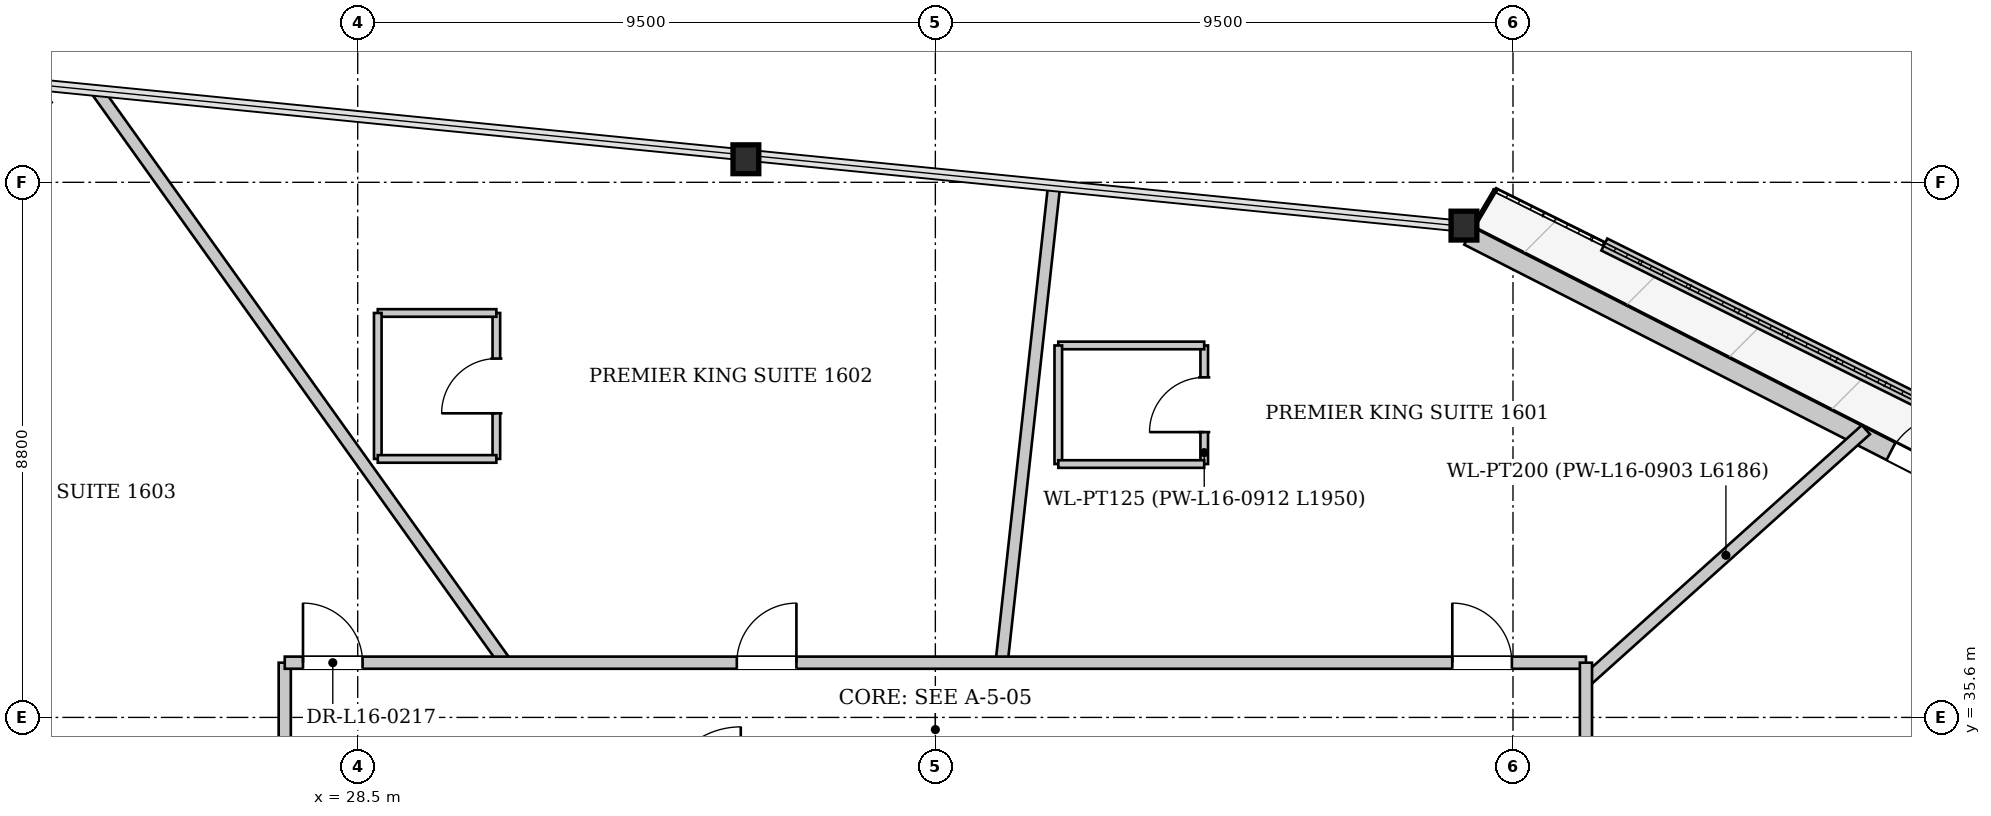
"""IFC4 building model, lengths in metres.
Left out: names, types, materials, properties, quantities, classifications, styles, units other than length and angle.
Written with IfcOpenShell. Run it as: python <this file> out.ifc"""

import sys

from ifc_helpers import new_model, si_unit, direction, frame, frame_2d, origin, origin_2d, place, context, subcontext, project, spatial, rectangle, i_section, extrude, source, transform, mapped, element, fill, save


model = new_model("IFC4")
c1 = context("Model", 3, precision=1e-05, world=origin(), true_north=direction((0.0, 1.0)))
c2 = subcontext(c1, "Body", "Model", "MODEL_VIEW")
j1 = project(units=[si_unit("LENGTHUNIT", "METRE"), si_unit("PLANEANGLEUNIT", "RADIAN")], contexts=[c1])
p1 = place(None, origin())
s1 = spatial("IfcSite", under=j1, at=p1, CompositionType="ELEMENT")
p2 = place(p1, origin())
s2 = spatial("IfcBuilding", under=s1, at=p2, CompositionType="ELEMENT")
p3 = place(p2, frame((0.0, 0.0, 64.8)))
s3 = spatial("IfcBuildingStorey", under=s2, at=p3, CompositionType="ELEMENT", Elevation=64.8)
m1 = source(origin(), c2, "Body", "SweptSolid", [
    extrude(i_section(OverallWidth=0.424, OverallDepth=0.474, WebThickness=0.043, FlangeThickness=0.068, at=origin_2d()), origin(), (0.0, 0.0, 1.0), 3.399),
])
p4 = place(p3, frame((46.844, 43.66, 0.0), z_axis=(-0.088495926026, 0.01659298613, 0.995938323335), x_axis=(-0.18428853505, -0.982872186934, 0.0)))
e1 = element("IfcColumn", 1, at=p4, inside=s3, PredefinedType="COLUMN", context=c2, shape_type="MappedRepresentation", body=[
    mapped(m1, transform((0.0, 0.0, 0.0), x_axis=(1.0, 0.0, 0.0), y_axis=(0.0, 1.0, 0.0), z_axis=(0.0, 0.0, 1.0), scale=1.0)),
])
m2 = source(origin(), c2, "Body", "SweptSolid", [
    extrude(i_section(OverallWidth=0.424, OverallDepth=0.474, WebThickness=0.043, FlangeThickness=0.068, at=origin_2d()), origin(), (0.0, 0.0, 1.0), 3.4),
])
p5 = place(p3, frame((35.034, 44.833, 0.0), z_axis=(-0.08817834006, -0.03181026437, 0.995596648962), x_axis=(0.339343270356, -0.940662609475, 0.0)))
e2 = element("IfcColumn", 2, at=p5, inside=s3, PredefinedType="COLUMN", context=c2, shape_type="MappedRepresentation", body=[
    mapped(m2, transform((0.0, 0.0, 0.0), x_axis=(1.0, 0.0, 0.0), y_axis=(0.0, 1.0, 0.0), z_axis=(0.0, 0.0, 1.0), scale=1.0)),
])
m3 = source(origin(), c2, "Body", "SweptSolid", [
    extrude(i_section(OverallWidth=0.308, OverallDepth=0.814, WebThickness=0.021, FlangeThickness=0.04, at=origin_2d()), origin(), (0.0, 0.0, 1.0), 3.409),
])
p6 = place(p3, frame((23.224, 46.006, 0.0), z_axis=(-0.087656538504, -0.079922138048, 0.992939465983), x_axis=(0.673753857686, -0.738955843913, 0.0)))
e3 = element("IfcColumn", 3, at=p6, inside=s3, PredefinedType="COLUMN", context=c2, shape_type="MappedRepresentation", body=[
    mapped(m3, transform((0.0, 0.0, 0.0), x_axis=(1.0, 0.0, 0.0), y_axis=(0.0, 1.0, 0.0), z_axis=(0.0, 0.0, 1.0), scale=1.0)),
])
p7 = place(p3, frame((46.771, 43.517, 0.0), z_axis=(0.0, 0.0, 1.0), x_axis=(0.890856769482, -0.454284290141, 0.0)))
e4 = element("IfcWall", 4, at=p7, inside=s3, PredefinedType="SOLIDWALL", context=c2, shape_type="SweptSolid", body=[
    extrude(rectangle(XDim=23.736, YDim=0.32, at=frame_2d((11.868, 0.0))), origin(), (0.0, 0.0, 1.0), 2.592),
])
p8 = place(p7, frame((7.796, 0.0, 0.0)))
e5 = element("IfcOpeningElement", 5, at=p8, cuts=e4, PredefinedType="OPENING", context=c2, shape_type="SweptSolid", body=[
    extrude(rectangle(XDim=1.1, YDim=2.3, at=frame_2d((0.55, 1.15))), frame((0.0, 0.17, 0.0), z_axis=(0.0, -1.0, 0.0), x_axis=(1.0, 0.0, 0.0)), (0.0, 0.0, 1.0), 0.34),
])
p9 = place(p7, frame((16.665, 0.0, 0.272)))
e6 = element("IfcOpeningElement", 6, at=p9, cuts=e4, PredefinedType="OPENING", context=c2, shape_type="SweptSolid", body=[
    extrude(rectangle(XDim=1.8, YDim=2.2, at=frame_2d((0.9, 1.1))), frame((0.0, 0.17, 0.0), z_axis=(0.0, -1.0, 0.0), x_axis=(1.0, 0.0, 0.0)), (0.0, 0.0, 1.0), 0.34),
])
p10 = place(p3, frame((67.87, 33.994, 0.0), z_axis=(0.0, 0.0, 1.0), x_axis=(-0.895402951346, 0.445256729002, 0.0)))
e7 = element("IfcWall", 7, at=p10, inside=s3, PredefinedType="PARAPET", context=c2, shape_type="SweptSolid", body=[
    extrude(rectangle(XDim=21.071, YDim=0.22, at=frame_2d((10.536, 0.0))), origin(), (0.0, 0.0, 1.0), 0.3),
])
p11 = place(p3, frame((48.7, 36.201, 0.0), z_axis=(0.0, 0.0, 1.0), x_axis=(0.744315723631, 0.667827899653, 0.0)))
e8 = element("IfcWall", 8, at=p11, inside=s3, PredefinedType="PARTITIONING", context=c2, shape_type="SweptSolid", body=[
    extrude(rectangle(XDim=6.186, YDim=0.2, at=frame_2d((3.093, 0.0))), origin(), (0.0, 0.0, 1.0), 3.3),
])
p12 = place(p3, frame((39.09, 36.5, 0.0), z_axis=(0.0, 0.0, 1.0), x_axis=(0.109405527684, 0.993997198443, 0.0)))
e9 = element("IfcWall", 9, at=p12, inside=s3, PredefinedType="PARTITIONING", context=c2, shape_type="SweptSolid", body=[
    extrude(rectangle(XDim=7.862, YDim=0.2, at=frame_2d((3.931, 0.0))), origin(), (0.0, 0.0, 1.0), 3.3),
])
p13 = place(p3, frame((30.929, 36.5, 0.0), z_axis=(0.0, 0.0, 1.0), x_axis=(-0.581222159054, 0.8137449243, 0.0)))
e10 = element("IfcWall", 10, at=p13, inside=s3, PredefinedType="PARTITIONING", context=c2, shape_type="SweptSolid", body=[
    extrude(rectangle(XDim=11.522, YDim=0.2, at=frame_2d((5.761, 0.0))), origin(), (0.0, 0.0, 1.0), 3.3),
])
p14 = place(p3, frame((42.422, 39.767, 0.0), z_axis=(0.0, 0.0, 1.0), x_axis=(0.0, 1.0, 0.0)))
e11 = element("IfcWall", 11, at=p14, inside=s3, PredefinedType="PARTITIONING", context=c2, shape_type="SweptSolid", body=[
    extrude(rectangle(XDim=1.95, YDim=0.125, at=frame_2d((0.975, 0.0))), origin(), (0.0, 0.0, 1.0), 3.3),
])
p15 = place(p14, frame((0.525, 0.0, 0.0)))
e12 = element("IfcOpeningElement", 12, at=p15, cuts=e11, PredefinedType="OPENING", context=c2, shape_type="SweptSolid", body=[
    extrude(rectangle(XDim=0.9, YDim=2.1, at=frame_2d((0.45, 1.05))), frame((0.0, 0.073, 0.0), z_axis=(0.0, -1.0, 0.0), x_axis=(1.0, 0.0, 0.0)), (0.0, 0.0, 1.0), 0.145),
])
p16 = place(p3, frame((42.422, 41.717, 0.0), z_axis=(0.0, 0.0, 1.0), x_axis=(-1.0, 0.0, 0.0)))
e13 = element("IfcWall", 13, at=p16, inside=s3, PredefinedType="PARTITIONING", context=c2, shape_type="SweptSolid", body=[
    extrude(rectangle(XDim=2.4, YDim=0.125, at=frame_2d((1.2, 0.0))), origin(), (0.0, 0.0, 1.0), 3.3),
])
p17 = place(p3, frame((40.022, 41.717, 0.0), z_axis=(0.0, 0.0, 1.0), x_axis=(0.0, -1.0, 0.0)))
e14 = element("IfcWall", 14, at=p17, inside=s3, PredefinedType="PARTITIONING", context=c2, shape_type="SweptSolid", body=[
    extrude(rectangle(XDim=1.95, YDim=0.125, at=frame_2d((0.975, 0.0))), origin(), (0.0, 0.0, 1.0), 3.3),
])
p18 = place(p3, frame((40.022, 39.767, 0.0), z_axis=(0.0, 0.0, 1.0), x_axis=(1.0, 0.0, 0.0)))
e15 = element("IfcWall", 15, at=p18, inside=s3, PredefinedType="PARTITIONING", context=c2, shape_type="SweptSolid", body=[
    extrude(rectangle(XDim=2.4, YDim=0.125, at=frame_2d((1.2, 0.0))), origin(), (0.0, 0.0, 1.0), 3.3),
])
p19 = place(p3, frame((30.78, 39.851, 0.0), z_axis=(0.0, 0.0, 1.0), x_axis=(0.0, 1.0, 0.0)))
e16 = element("IfcWall", 16, at=p19, inside=s3, PredefinedType="PARTITIONING", context=c2, shape_type="SweptSolid", body=[
    extrude(rectangle(XDim=2.4, YDim=0.125, at=frame_2d((1.2, 0.0))), origin(), (0.0, 0.0, 1.0), 3.3),
])
p20 = place(p19, frame((0.75, 0.0, 0.0)))
e17 = element("IfcOpeningElement", 17, at=p20, cuts=e16, PredefinedType="OPENING", context=c2, shape_type="SweptSolid", body=[
    extrude(rectangle(XDim=0.9, YDim=2.1, at=frame_2d((0.45, 1.05))), frame((0.0, 0.073, 0.0), z_axis=(0.0, -1.0, 0.0), x_axis=(1.0, 0.0, 0.0)), (0.0, 0.0, 1.0), 0.145),
])
p21 = place(p3, frame((30.78, 42.251, 0.0), z_axis=(0.0, 0.0, 1.0), x_axis=(-1.0, 0.0, 0.0)))
e18 = element("IfcWall", 18, at=p21, inside=s3, PredefinedType="PARTITIONING", context=c2, shape_type="SweptSolid", body=[
    extrude(rectangle(XDim=1.95, YDim=0.125, at=frame_2d((0.975, 0.0))), origin(), (0.0, 0.0, 1.0), 3.3),
])
p22 = place(p3, frame((28.83, 42.251, 0.0), z_axis=(0.0, 0.0, 1.0), x_axis=(0.0, -1.0, 0.0)))
e19 = element("IfcWall", 19, at=p22, inside=s3, PredefinedType="PARTITIONING", context=c2, shape_type="SweptSolid", body=[
    extrude(rectangle(XDim=2.4, YDim=0.125, at=frame_2d((1.2, 0.0))), origin(), (0.0, 0.0, 1.0), 3.3),
])
p23 = place(p3, frame((28.83, 39.851, 0.0), z_axis=(0.0, 0.0, 1.0), x_axis=(1.0, 0.0, 0.0)))
e20 = element("IfcWall", 20, at=p23, inside=s3, PredefinedType="PARTITIONING", context=c2, shape_type="SweptSolid", body=[
    extrude(rectangle(XDim=1.95, YDim=0.125, at=frame_2d((0.975, 0.0))), origin(), (0.0, 0.0, 1.0), 3.3),
])
p24 = place(p3, frame((27.3, 16.7, 0.0), z_axis=(0.0, 0.0, 1.0), x_axis=(0.0, 1.0, 0.0)))
e21 = element("IfcWall", 21, at=p24, inside=s3, PredefinedType="PARTITIONING", context=c2, shape_type="SweptSolid", body=[
    extrude(rectangle(XDim=19.8, YDim=0.2, at=frame_2d((9.9, 0.0))), origin(), (0.0, 0.0, 1.0), 3.3),
])
p25 = place(p24, frame((8.604, 0.0, 0.0)))
e22 = element("IfcOpeningElement", 22, at=p25, cuts=e21, PredefinedType="OPENING", context=c2, shape_type="SweptSolid", body=[
    extrude(rectangle(XDim=0.98, YDim=2.15, at=frame_2d((0.49, 1.075))), frame((0.0, 0.11, 0.0), z_axis=(0.0, -1.0, 0.0), x_axis=(1.0, 0.0, 0.0)), (0.0, 0.0, 1.0), 0.22),
])
p26 = place(p24, frame((0.3, 0.0, 0.0)))
e23 = element("IfcOpeningElement", 23, at=p26, cuts=e21, PredefinedType="OPENING", context=c2, shape_type="SweptSolid", body=[
    extrude(rectangle(XDim=0.98, YDim=2.15, at=frame_2d((0.49, 1.075))), frame((0.0, 0.11, 0.0), z_axis=(0.0, -1.0, 0.0), x_axis=(1.0, 0.0, 0.0)), (0.0, 0.0, 1.0), 0.22),
])
p27 = place(p3, frame((27.3, 36.5, 0.0), z_axis=(0.0, 0.0, 1.0), x_axis=(1.0, 0.0, 0.0)))
e24 = element("IfcWall", 24, at=p27, inside=s3, PredefinedType="PARTITIONING", context=c2, shape_type="SweptSolid", body=[
    extrude(rectangle(XDim=21.4, YDim=0.2, at=frame_2d((10.7, 0.0))), origin(), (0.0, 0.0, 1.0), 3.3),
])
p28 = place(p27, frame((19.202, 0.0, 0.0)))
e25 = element("IfcOpeningElement", 25, at=p28, cuts=e24, PredefinedType="OPENING", context=c2, shape_type="SweptSolid", body=[
    extrude(rectangle(XDim=0.98, YDim=2.15, at=frame_2d((0.49, 1.075))), frame((0.0, 0.11, 0.0), z_axis=(0.0, -1.0, 0.0), x_axis=(1.0, 0.0, 0.0)), (0.0, 0.0, 1.0), 0.22),
])
p29 = place(p27, frame((7.435, 0.0, 0.0)))
e26 = element("IfcOpeningElement", 26, at=p29, cuts=e24, PredefinedType="OPENING", context=c2, shape_type="SweptSolid", body=[
    extrude(rectangle(XDim=0.98, YDim=2.15, at=frame_2d((0.49, 1.075))), frame((0.0, 0.11, 0.0), z_axis=(0.0, -1.0, 0.0), x_axis=(1.0, 0.0, 0.0)), (0.0, 0.0, 1.0), 0.22),
])
p30 = place(p27, frame((0.3, 0.0, 0.0)))
e27 = element("IfcOpeningElement", 27, at=p30, cuts=e24, PredefinedType="OPENING", context=c2, shape_type="SweptSolid", body=[
    extrude(rectangle(XDim=0.98, YDim=2.15, at=frame_2d((0.49, 1.075))), frame((0.0, 0.11, 0.0), z_axis=(0.0, -1.0, 0.0), x_axis=(1.0, 0.0, 0.0)), (0.0, 0.0, 1.0), 0.22),
])
p31 = place(p3, frame((48.7, 16.7, 0.0), z_axis=(0.0, 0.0, 1.0), x_axis=(0.0, 1.0, 0.0)))
e28 = element("IfcWall", 28, at=p31, inside=s3, PredefinedType="PARTITIONING", context=c2, shape_type="SweptSolid", body=[
    extrude(rectangle(XDim=19.8, YDim=0.2, at=frame_2d((9.9, 0.0))), origin(), (0.0, 0.0, 1.0), 3.3),
])
p32 = place(p31, frame((6.752, 0.0, 0.0)))
e29 = element("IfcOpeningElement", 29, at=p32, cuts=e28, PredefinedType="OPENING", context=c2, shape_type="SweptSolid", body=[
    extrude(rectangle(XDim=0.98, YDim=2.15, at=frame_2d((0.49, 1.075))), frame((0.0, 0.11, 0.0), z_axis=(0.0, -1.0, 0.0), x_axis=(1.0, 0.0, 0.0)), (0.0, 0.0, 1.0), 0.22),
])
p33 = place(p31, frame((17.487, 0.0, 0.0)))
e30 = element("IfcOpeningElement", 30, at=p33, cuts=e28, PredefinedType="OPENING", context=c2, shape_type="SweptSolid", body=[
    extrude(rectangle(XDim=0.98, YDim=2.15, at=frame_2d((0.49, 1.075))), frame((0.0, 0.11, 0.0), z_axis=(0.0, -1.0, 0.0), x_axis=(1.0, 0.0, 0.0)), (0.0, 0.0, 1.0), 0.22),
])
m4 = source(origin(), c2, "Body", "SweptSolid", [
    extrude(rectangle(XDim=1.1, YDim=2.3, at=frame_2d((0.55, 1.15))), frame((0.0, 0.025, 0.0), z_axis=(0.0, -1.0, 0.0), x_axis=(1.0, 0.0, 0.0)), (0.0, 0.0, 1.0), 0.05),
])
p34 = place(p8, origin())
e31 = element("IfcDoor", 31, at=p34, inside=s3, OperationType="SINGLE_SWING_RIGHT", PredefinedType="DOOR", context=c2, shape_type="MappedRepresentation", body=[
    mapped(m4, transform((0.0, 0.0, 0.0), x_axis=(1.0, 0.0, 0.0), y_axis=(0.0, 1.0, 0.0), z_axis=(0.0, 0.0, 1.0), scale=1.0)),
])
fill(e5, e31)
m5 = source(origin(), c2, "Body", "SweptSolid", [
    extrude(rectangle(XDim=0.9, YDim=2.1, at=frame_2d((0.45, 1.05))), frame((0.0, 0.025, 0.0), z_axis=(0.0, -1.0, 0.0), x_axis=(1.0, 0.0, 0.0)), (0.0, 0.0, 1.0), 0.05),
])
p35 = place(p15, origin())
e32 = element("IfcDoor", 32, at=p35, inside=s3, OperationType="SINGLE_SWING_LEFT", PredefinedType="DOOR", context=c2, shape_type="MappedRepresentation", body=[
    mapped(m5, transform((0.0, 0.0, 0.0), x_axis=(1.0, 0.0, 0.0), y_axis=(0.0, 1.0, 0.0), z_axis=(0.0, 0.0, 1.0), scale=1.0)),
])
fill(e12, e32)
p36 = place(p20, origin())
e33 = element("IfcDoor", 33, at=p36, inside=s3, OperationType="SINGLE_SWING_LEFT", PredefinedType="DOOR", context=c2, shape_type="MappedRepresentation", body=[
    mapped(m5, transform((0.0, 0.0, 0.0), x_axis=(1.0, 0.0, 0.0), y_axis=(0.0, 1.0, 0.0), z_axis=(0.0, 0.0, 1.0), scale=1.0)),
])
fill(e17, e33)
m6 = source(origin(), c2, "Body", "SweptSolid", [
    extrude(rectangle(XDim=0.98, YDim=2.15, at=frame_2d((0.49, 1.075))), frame((0.0, 0.025, 0.0), z_axis=(0.0, -1.0, 0.0), x_axis=(1.0, 0.0, 0.0)), (0.0, 0.0, 1.0), 0.05),
])
p37 = place(p28, origin())
e34 = element("IfcDoor", 34, at=p37, inside=s3, OperationType="SINGLE_SWING_LEFT", PredefinedType="DOOR", context=c2, shape_type="MappedRepresentation", body=[
    mapped(m6, transform((0.0, 0.0, 0.0), x_axis=(1.0, 0.0, 0.0), y_axis=(0.0, 1.0, 0.0), z_axis=(0.0, 0.0, 1.0), scale=1.0)),
])
fill(e25, e34)
p38 = place(p29, origin())
e35 = element("IfcDoor", 35, at=p38, inside=s3, OperationType="SINGLE_SWING_RIGHT", PredefinedType="DOOR", context=c2, shape_type="MappedRepresentation", body=[
    mapped(m6, transform((0.0, 0.0, 0.0), x_axis=(1.0, 0.0, 0.0), y_axis=(0.0, 1.0, 0.0), z_axis=(0.0, 0.0, 1.0), scale=1.0)),
])
fill(e26, e35)
p39 = place(p30, origin())
e36 = element("IfcDoor", 36, at=p39, inside=s3, OperationType="SINGLE_SWING_LEFT", PredefinedType="DOOR", context=c2, shape_type="MappedRepresentation", body=[
    mapped(m6, transform((0.0, 0.0, 0.0), x_axis=(1.0, 0.0, 0.0), y_axis=(0.0, 1.0, 0.0), z_axis=(0.0, 0.0, 1.0), scale=1.0)),
])
fill(e27, e36)
save(model, sys.argv[1])
